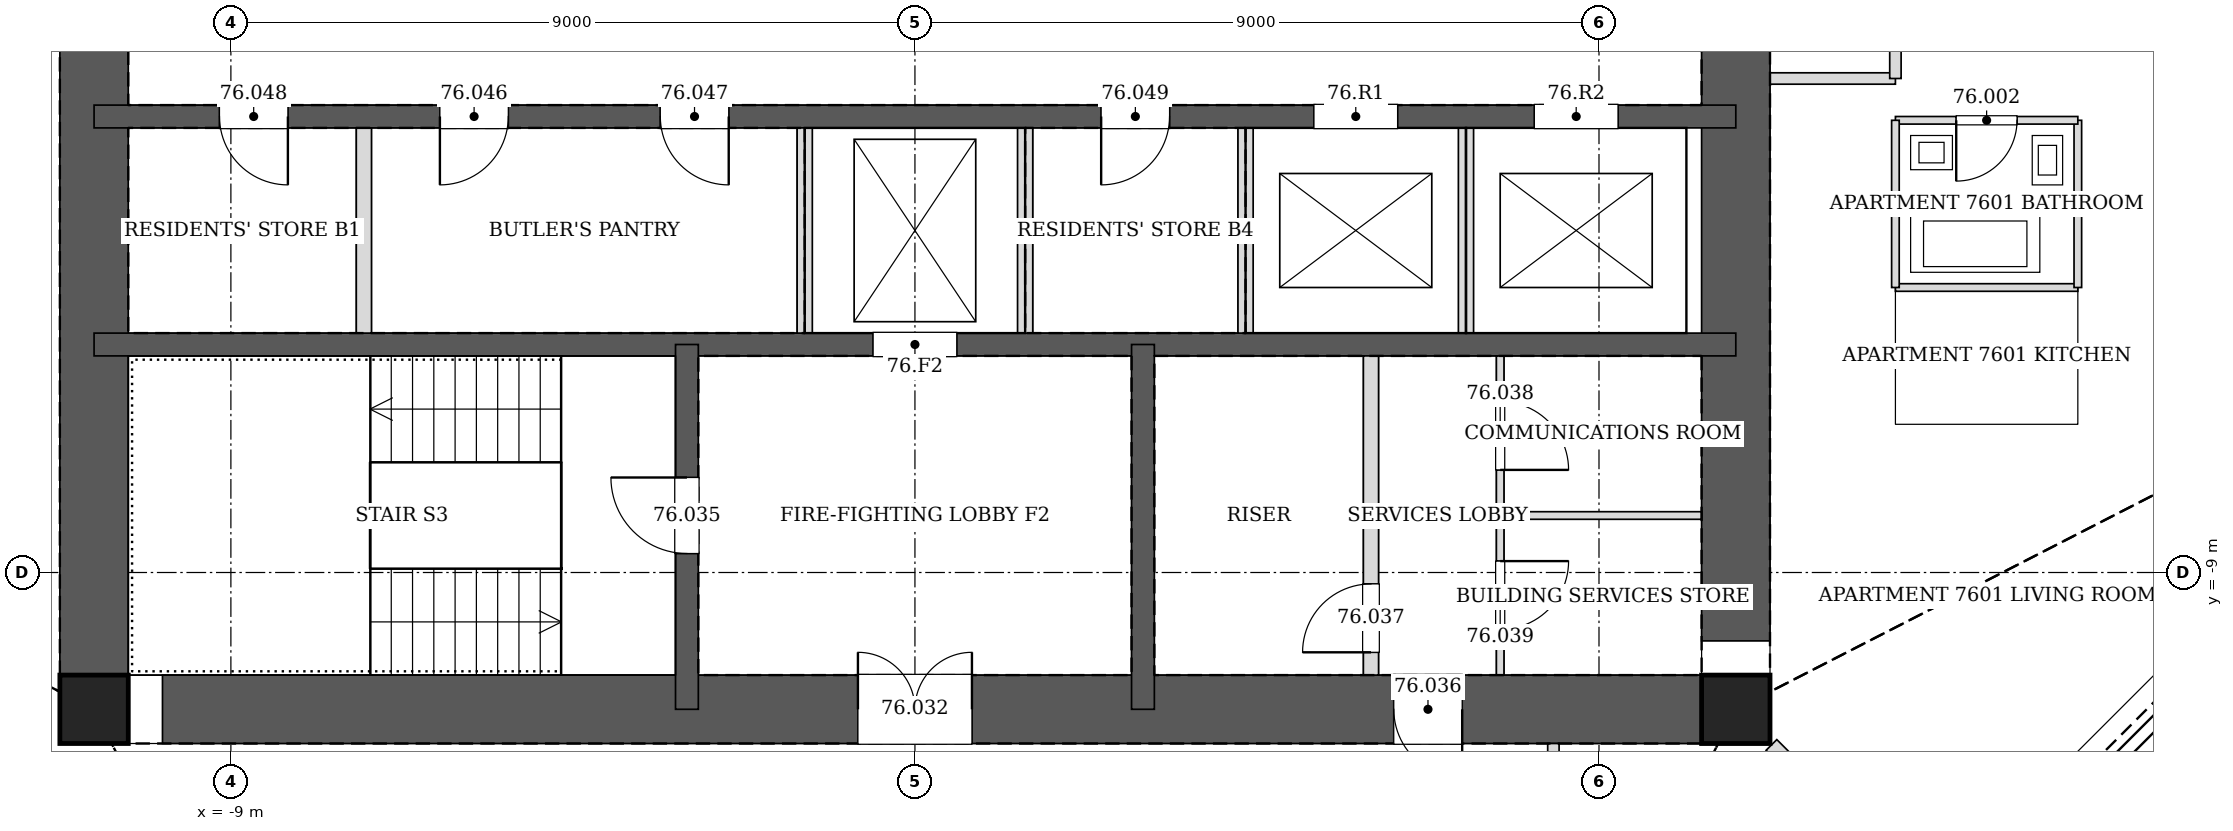
"""IFC4 building model, lengths in metres.
Left out: names, types, materials, properties, quantities, classifications, styles, units other than length and angle.
Written with IfcOpenShell. Run it as: python <this file> out.ifc"""

import sys

from ifc_helpers import new_model, si_unit, direction, frame, frame_2d, origin, origin_2d, place, context, subcontext, project, spatial, rectangle, hollow_rectangle, extrude, element, fill, save


model = new_model("IFC4")
c1 = context("Model", 3, precision=1e-05, world=origin(), true_north=direction((0.0, 1.0)))
c2 = subcontext(c1, "Body", "Model", "MODEL_VIEW")
j1 = project(units=[si_unit("LENGTHUNIT", "METRE"), si_unit("PLANEANGLEUNIT", "RADIAN")], contexts=[c1])
p1 = place(None, origin())
s1 = spatial("IfcSite", under=j1, at=p1, CompositionType="ELEMENT")
p2 = place(p1, origin())
s2 = spatial("IfcBuilding", under=s1, at=p2, CompositionType="ELEMENT")
p3 = place(p2, frame((0.0, 0.0, 308.2)))
s3 = spatial("IfcBuildingStorey", under=s2, at=p3, CompositionType="ELEMENT", Elevation=308.2)
for number, where, z_axis, x_axis in (
    (1, (-10.8, -10.8, 0.0), (0.0, 0.0, 1.0), (1.0, 0.0, 0.0)),
    (2, (10.8, -10.8, 0.0), (0.0, 0.0, 1.0), (1.0, 0.0, 0.0)),
):
    element("IfcColumn", number, at=place(p3, frame(where, z_axis=z_axis, x_axis=x_axis)), inside=s3, PredefinedType="COLUMN", context=c2, shape_type="SweptSolid", body=[
        extrude(hollow_rectangle(XDim=0.9, YDim=0.9, WallThickness=0.04, at=origin_2d()), origin(), (0.0, 0.0, 1.0), 3.4),
    ])
p4 = place(p3, frame((-10.8, -10.8, 0.0), z_axis=(0.0, 0.0, 1.0), x_axis=(1.0, 0.0, 0.0)))
e3 = element("IfcWall", 3, at=p4, inside=s3, PredefinedType="SOLIDWALL", context=c2, shape_type="SweptSolid", body=[
    extrude(rectangle(XDim=21.6, YDim=0.9, at=frame_2d((10.8, 0.0))), origin(), (0.0, 0.0, 1.0), 3.4),
])
p5 = place(p4, frame((10.05, 0.0, 0.0)))
e4 = element("IfcOpeningElement", 4, at=p5, cuts=e3, PredefinedType="OPENING", context=c2, shape_type="SweptSolid", body=[
    extrude(rectangle(XDim=1.5, YDim=2.1, at=frame_2d((0.75, 1.05))), frame((0.0, 0.46, 0.0), z_axis=(0.0, -1.0, 0.0), x_axis=(1.0, 0.0, 0.0)), (0.0, 0.0, 1.0), 0.92),
])
p6 = place(p4, frame((17.1, 0.0, 0.0)))
e5 = element("IfcOpeningElement", 5, at=p6, cuts=e3, PredefinedType="OPENING", context=c2, shape_type="SweptSolid", body=[
    extrude(rectangle(XDim=0.9, YDim=2.1, at=frame_2d((0.45, 1.05))), frame((0.0, 0.46, 0.0), z_axis=(0.0, -1.0, 0.0), x_axis=(1.0, 0.0, 0.0)), (0.0, 0.0, 1.0), 0.92),
])
p7 = place(p3, frame((10.8, -10.8, 0.0), z_axis=(0.0, 0.0, 1.0), x_axis=(0.0, 1.0, 0.0)))
e6 = element("IfcWall", 6, at=p7, inside=s3, PredefinedType="SOLIDWALL", context=c2, shape_type="SweptSolid", body=[
    extrude(rectangle(XDim=21.6, YDim=0.9, at=frame_2d((10.8, 0.0))), origin(), (0.0, 0.0, 1.0), 3.4),
])
p8 = place(p7, frame((11.7, 0.0, 0.0)))
e7 = element("IfcOpeningElement", 7, at=p8, cuts=e6, PredefinedType="OPENING", context=c2, shape_type="SweptSolid", body=[
    extrude(rectangle(XDim=1.2, YDim=2.1, at=frame_2d((0.6, 1.05))), frame((0.0, 0.46, 0.0), z_axis=(0.0, -1.0, 0.0), x_axis=(1.0, 0.0, 0.0)), (0.0, 0.0, 1.0), 0.92),
])
p9 = place(p7, frame((8.7, 0.0, 0.0)))
e8 = element("IfcOpeningElement", 8, at=p9, cuts=e6, PredefinedType="OPENING", context=c2, shape_type="SweptSolid", body=[
    extrude(rectangle(XDim=1.2, YDim=2.1, at=frame_2d((0.6, 1.05))), frame((0.0, 0.46, 0.0), z_axis=(0.0, -1.0, 0.0), x_axis=(1.0, 0.0, 0.0)), (0.0, 0.0, 1.0), 0.92),
])
p10 = place(p3, frame((-10.8, 10.8, 0.0), z_axis=(0.0, 0.0, 1.0), x_axis=(0.0, -1.0, 0.0)))
e9 = element("IfcWall", 9, at=p10, inside=s3, PredefinedType="SOLIDWALL", context=c2, shape_type="SweptSolid", body=[
    extrude(rectangle(XDim=21.6, YDim=0.9, at=frame_2d((10.8, 0.0))), origin(), (0.0, 0.0, 1.0), 3.4),
])
p11 = place(p10, frame((8.7, 0.0, 0.0)))
e10 = element("IfcOpeningElement", 10, at=p11, cuts=e9, PredefinedType="OPENING", context=c2, shape_type="SweptSolid", body=[
    extrude(rectangle(XDim=1.2, YDim=2.1, at=frame_2d((0.6, 1.05))), frame((0.0, 0.46, 0.0), z_axis=(0.0, -1.0, 0.0), x_axis=(1.0, 0.0, 0.0)), (0.0, 0.0, 1.0), 0.92),
])
p12 = place(p10, frame((11.7, 0.0, 0.0)))
e11 = element("IfcOpeningElement", 11, at=p12, cuts=e9, PredefinedType="OPENING", context=c2, shape_type="SweptSolid", body=[
    extrude(rectangle(XDim=1.2, YDim=2.1, at=frame_2d((0.6, 1.05))), frame((0.0, 0.46, 0.0), z_axis=(0.0, -1.0, 0.0), x_axis=(1.0, 0.0, 0.0)), (0.0, 0.0, 1.0), 0.92),
])
p13 = place(p3, frame((-10.8, -3.0, 0.0), z_axis=(0.0, 0.0, 1.0), x_axis=(1.0, 0.0, 0.0)))
e12 = element("IfcWall", 12, at=p13, inside=s3, PredefinedType="SOLIDWALL", context=c2, shape_type="SweptSolid", body=[
    extrude(rectangle(XDim=21.6, YDim=0.3, at=frame_2d((10.8, 0.0))), origin(), (0.0, 0.0, 1.0), 3.4),
])
p14 = place(p13, frame((4.55, 0.0, 0.0)))
e13 = element("IfcOpeningElement", 13, at=p14, cuts=e12, PredefinedType="OPENING", context=c2, shape_type="SweptSolid", body=[
    extrude(rectangle(XDim=0.9, YDim=2.1, at=frame_2d((0.45, 1.05))), frame((0.0, 0.16, 0.0), z_axis=(0.0, -1.0, 0.0), x_axis=(1.0, 0.0, 0.0)), (0.0, 0.0, 1.0), 0.32),
])
p15 = place(p13, frame((7.45, 0.0, 0.0)))
e14 = element("IfcOpeningElement", 14, at=p15, cuts=e12, PredefinedType="OPENING", context=c2, shape_type="SweptSolid", body=[
    extrude(rectangle(XDim=0.9, YDim=2.1, at=frame_2d((0.45, 1.05))), frame((0.0, 0.16, 0.0), z_axis=(0.0, -1.0, 0.0), x_axis=(1.0, 0.0, 0.0)), (0.0, 0.0, 1.0), 0.32),
])
p16 = place(p13, frame((1.65, 0.0, 0.0)))
e15 = element("IfcOpeningElement", 15, at=p16, cuts=e12, PredefinedType="OPENING", context=c2, shape_type="SweptSolid", body=[
    extrude(rectangle(XDim=0.9, YDim=2.1, at=frame_2d((0.45, 1.05))), frame((0.0, 0.16, 0.0), z_axis=(0.0, -1.0, 0.0), x_axis=(1.0, 0.0, 0.0)), (0.0, 0.0, 1.0), 0.32),
])
p17 = place(p13, frame((13.25, 0.0, 0.0)))
e16 = element("IfcOpeningElement", 16, at=p17, cuts=e12, PredefinedType="OPENING", context=c2, shape_type="SweptSolid", body=[
    extrude(rectangle(XDim=0.9, YDim=2.1, at=frame_2d((0.45, 1.05))), frame((0.0, 0.16, 0.0), z_axis=(0.0, -1.0, 0.0), x_axis=(1.0, 0.0, 0.0)), (0.0, 0.0, 1.0), 0.32),
])
p18 = place(p13, frame((16.05, 0.0, 0.0)))
e17 = element("IfcOpeningElement", 17, at=p18, cuts=e12, PredefinedType="OPENING", context=c2, shape_type="SweptSolid", body=[
    extrude(rectangle(XDim=1.1, YDim=2.1, at=frame_2d((0.55, 1.05))), frame((0.0, 0.16, 0.0), z_axis=(0.0, -1.0, 0.0), x_axis=(1.0, 0.0, 0.0)), (0.0, 0.0, 1.0), 0.32),
])
p19 = place(p13, frame((18.95, 0.0, 0.0)))
e18 = element("IfcOpeningElement", 18, at=p19, cuts=e12, PredefinedType="OPENING", context=c2, shape_type="SweptSolid", body=[
    extrude(rectangle(XDim=1.1, YDim=2.1, at=frame_2d((0.55, 1.05))), frame((0.0, 0.16, 0.0), z_axis=(0.0, -1.0, 0.0), x_axis=(1.0, 0.0, 0.0)), (0.0, 0.0, 1.0), 0.32),
])
p20 = place(p3, frame((-10.8, -6.0, 0.0), z_axis=(0.0, 0.0, 1.0), x_axis=(1.0, 0.0, 0.0)))
e19 = element("IfcWall", 19, at=p20, inside=s3, PredefinedType="SOLIDWALL", context=c2, shape_type="SweptSolid", body=[
    extrude(rectangle(XDim=21.6, YDim=0.3, at=frame_2d((10.8, 0.0))), origin(), (0.0, 0.0, 1.0), 3.4),
])
p21 = place(p20, frame((10.25, 0.0, 0.0)))
e20 = element("IfcOpeningElement", 20, at=p21, cuts=e19, PredefinedType="OPENING", context=c2, shape_type="SweptSolid", body=[
    extrude(rectangle(XDim=1.1, YDim=2.1, at=frame_2d((0.55, 1.05))), frame((0.0, 0.16, 0.0), z_axis=(0.0, -1.0, 0.0), x_axis=(1.0, 0.0, 0.0)), (0.0, 0.0, 1.0), 0.32),
])
p22 = place(p3, frame((-3.0, -6.0, 0.0), z_axis=(0.0, 0.0, 1.0), x_axis=(0.0, -1.0, 0.0)))
e21 = element("IfcWall", 21, at=p22, inside=s3, PredefinedType="SOLIDWALL", context=c2, shape_type="SweptSolid", body=[
    extrude(rectangle(XDim=4.8, YDim=0.3, at=frame_2d((2.4, 0.0))), origin(), (0.0, 0.0, 1.0), 3.4),
])
p23 = place(p22, frame((1.75, 0.0, 0.0)))
e22 = element("IfcOpeningElement", 22, at=p23, cuts=e21, PredefinedType="OPENING", context=c2, shape_type="SweptSolid", body=[
    extrude(rectangle(XDim=1.0, YDim=2.1, at=frame_2d((0.5, 1.05))), frame((0.0, 0.16, 0.0), z_axis=(0.0, -1.0, 0.0), x_axis=(1.0, 0.0, 0.0)), (0.0, 0.0, 1.0), 0.32),
])
p24 = place(p3, frame((3.0, -6.0, 0.0), z_axis=(0.0, 0.0, 1.0), x_axis=(0.0, -1.0, 0.0)))
e23 = element("IfcWall", 23, at=p24, inside=s3, PredefinedType="SOLIDWALL", context=c2, shape_type="SweptSolid", body=[
    extrude(rectangle(XDim=4.8, YDim=0.3, at=frame_2d((2.4, 0.0))), origin(), (0.0, 0.0, 1.0), 3.4),
])
p25 = place(p3, frame((11.25, -2.5, 0.0), z_axis=(0.0, 0.0, 1.0), x_axis=(1.0, 0.0, 0.0)))
e24 = element("IfcWall", 24, at=p25, inside=s3, PredefinedType="PARTITIONING", context=c2, shape_type="SweptSolid", body=[
    extrude(rectangle(XDim=1.65, YDim=0.15, at=frame_2d((0.825, 0.0))), origin(), (0.0, 0.0, 1.0), 3.2),
])
p26 = place(p3, frame((12.9, -2.5, 0.0), z_axis=(0.0, 0.0, 1.0), x_axis=(0.0, 1.0, 0.0)))
e25 = element("IfcWall", 25, at=p26, inside=s3, PredefinedType="PARTITIONING", context=c2, shape_type="SweptSolid", body=[
    extrude(rectangle(XDim=2.318, YDim=0.15, at=frame_2d((1.159, 0.0))), origin(), (0.0, 0.0, 1.0), 3.2),
])
p27 = place(p3, frame((8.4, -12.9, 0.0), z_axis=(0.0, 0.0, 1.0), x_axis=(0.0, 1.0, 0.0)))
e26 = element("IfcWall", 26, at=p27, inside=s3, PredefinedType="PARTITIONING", context=c2, shape_type="SweptSolid", body=[
    extrude(rectangle(XDim=1.65, YDim=0.15, at=frame_2d((0.825, 0.0))), origin(), (0.0, 0.0, 1.0), 3.2),
])
p28 = place(p3, frame((15.3, -5.25, 0.0), z_axis=(0.0, 0.0, 1.0), x_axis=(-1.0, 0.0, 0.0)))
e27 = element("IfcWall", 27, at=p28, inside=s3, PredefinedType="PARTITIONING", context=c2, shape_type="SweptSolid", body=[
    extrude(rectangle(XDim=2.4, YDim=0.1, at=frame_2d((1.2, 0.0))), origin(), (0.0, 0.0, 1.0), 2.588),
])
p29 = place(p3, frame((15.3, -5.25, 0.0), z_axis=(0.0, 0.0, 1.0), x_axis=(0.0, 1.0, 0.0)))
e28 = element("IfcWall", 28, at=p29, inside=s3, PredefinedType="PARTITIONING", context=c2, shape_type="SweptSolid", body=[
    extrude(rectangle(XDim=2.2, YDim=0.1, at=frame_2d((1.1, 0.0))), origin(), (0.0, 0.0, 1.0), 3.2),
])
p30 = place(p3, frame((15.3, -3.05, 0.0), z_axis=(0.0, 0.0, 1.0), x_axis=(-1.0, 0.0, 0.0)))
e29 = element("IfcWall", 29, at=p30, inside=s3, PredefinedType="PARTITIONING", context=c2, shape_type="SweptSolid", body=[
    extrude(rectangle(XDim=2.4, YDim=0.1, at=frame_2d((1.2, 0.0))), origin(), (0.0, 0.0, 1.0), 2.588),
])
p31 = place(p30, frame((0.8, 0.0, 0.0)))
e30 = element("IfcOpeningElement", 30, at=p31, cuts=e29, PredefinedType="OPENING", context=c2, shape_type="SweptSolid", body=[
    extrude(rectangle(XDim=0.8, YDim=2.1, at=frame_2d((0.4, 1.05))), frame((0.0, 0.06, 0.0), z_axis=(0.0, -1.0, 0.0), x_axis=(1.0, 0.0, 0.0)), (0.0, 0.0, 1.0), 0.12),
])
p32 = place(p3, frame((12.9, -3.05, 0.0), z_axis=(0.0, 0.0, 1.0), x_axis=(0.0, -1.0, 0.0)))
e31 = element("IfcWall", 31, at=p32, inside=s3, PredefinedType="PARTITIONING", context=c2, shape_type="SweptSolid", body=[
    extrude(rectangle(XDim=2.2, YDim=0.1, at=frame_2d((1.1, 0.0))), origin(), (0.0, 0.0, 1.0), 3.2),
])
p33 = place(p3, frame((11.269, -11.269, 0.0), z_axis=(0.0, 0.0, 1.0), x_axis=(0.707106781187, -0.707106781187, 0.0)))
e32 = element("IfcWall", 32, at=p33, inside=s3, PredefinedType="PARTITIONING", context=c2, shape_type="SweptSolid", body=[
    extrude(rectangle(XDim=2.219, YDim=0.2, at=frame_2d((1.109, 0.0))), origin(), (0.0, 0.0, 1.0), 2.591),
])
for number, where, z_axis, x_axis in (
    (33, (-7.25, -5.85, 0.0), (0.0, 0.0, 1.0), (0.0, 1.0, 0.0)),
    (34, (-1.45, -5.85, 0.0), (0.0, 0.0, 1.0), (0.0, 1.0, 0.0)),
    (35, (1.45, -5.85, 0.0), (0.0, 0.0, 1.0), (0.0, 1.0, 0.0)),
    (36, (4.35, -5.85, 0.0), (0.0, 0.0, 1.0), (0.0, 1.0, 0.0)),
):
    element("IfcWall", number, at=place(p3, frame(where, z_axis=z_axis, x_axis=x_axis)), inside=s3, PredefinedType="PARTITIONING", context=c2, shape_type="SweptSolid", body=[
        extrude(rectangle(XDim=2.7, YDim=0.2, at=frame_2d((1.35, 0.0))), origin(), (0.0, 0.0, 1.0), 3.2),
    ])
p34 = place(p3, frame((7.25, -5.85, 0.0), z_axis=(0.0, 0.0, 1.0), x_axis=(0.0, 1.0, 0.0)))
e37 = element("IfcWall", 37, at=p34, inside=s3, PredefinedType="PARTITIONING", context=c2, shape_type="SweptSolid", body=[
    extrude(rectangle(XDim=2.7, YDim=0.2, at=frame_2d((1.35, 0.0))), origin(), (0.0, 0.0, 1.0), 3.4),
])
p35 = place(p3, frame((6.0, -10.35, 0.0), z_axis=(0.0, 0.0, 1.0), x_axis=(0.0, 1.0, 0.0)))
e38 = element("IfcWall", 38, at=p35, inside=s3, PredefinedType="PARTITIONING", context=c2, shape_type="SweptSolid", body=[
    extrude(rectangle(XDim=4.2, YDim=0.2, at=frame_2d((2.1, 0.0))), origin(), (0.0, 0.0, 1.0), 3.2),
])
p36 = place(p35, frame((0.3, 0.0, 0.0)))
e39 = element("IfcOpeningElement", 39, at=p36, cuts=e38, PredefinedType="OPENING", context=c2, shape_type="SweptSolid", body=[
    extrude(rectangle(XDim=0.9, YDim=2.1, at=frame_2d((0.45, 1.05))), frame((0.0, 0.11, 0.0), z_axis=(0.0, -1.0, 0.0), x_axis=(1.0, 0.0, 0.0)), (0.0, 0.0, 1.0), 0.22),
])
p37 = place(p3, frame((7.7, -10.35, 0.0), z_axis=(0.0, 0.0, 1.0), x_axis=(0.0, 1.0, 0.0)))
e40 = element("IfcWall", 40, at=p37, inside=s3, PredefinedType="PARTITIONING", context=c2, shape_type="SweptSolid", body=[
    extrude(rectangle(XDim=4.2, YDim=0.1, at=frame_2d((2.1, 0.0))), origin(), (0.0, 0.0, 1.0), 3.2),
])
p38 = place(p37, frame((2.7, 0.0, 0.0)))
e41 = element("IfcOpeningElement", 41, at=p38, cuts=e40, PredefinedType="OPENING", context=c2, shape_type="SweptSolid", body=[
    extrude(rectangle(XDim=0.9, YDim=2.1, at=frame_2d((0.45, 1.05))), frame((0.0, 0.06, 0.0), z_axis=(0.0, -1.0, 0.0), x_axis=(1.0, 0.0, 0.0)), (0.0, 0.0, 1.0), 0.12),
])
p39 = place(p37, frame((0.6, 0.0, 0.0)))
e42 = element("IfcOpeningElement", 42, at=p39, cuts=e40, PredefinedType="OPENING", context=c2, shape_type="SweptSolid", body=[
    extrude(rectangle(XDim=0.9, YDim=2.1, at=frame_2d((0.45, 1.05))), frame((0.0, 0.06, 0.0), z_axis=(0.0, -1.0, 0.0), x_axis=(1.0, 0.0, 0.0)), (0.0, 0.0, 1.0), 0.12),
])
p40 = place(p3, frame((7.7, -8.25, 0.0), z_axis=(0.0, 0.0, 1.0), x_axis=(1.0, 0.0, 0.0)))
e43 = element("IfcWall", 43, at=p40, inside=s3, PredefinedType="PARTITIONING", context=c2, shape_type="SweptSolid", body=[
    extrude(rectangle(XDim=2.65, YDim=0.1, at=frame_2d((1.325, 0.0))), origin(), (0.0, 0.0, 1.0), 3.2),
])
p41 = place(p31, origin())
e44 = element("IfcDoor", 44, at=p41, inside=s3, OperationType="SINGLE_SWING_RIGHT", PredefinedType="DOOR", context=c2, shape_type="SweptSolid", body=[
    extrude(rectangle(XDim=0.8, YDim=2.1, at=frame_2d((0.4, 1.05))), frame((0.0, 0.025, 0.0), z_axis=(0.0, -1.0, 0.0), x_axis=(1.0, 0.0, 0.0)), (0.0, 0.0, 1.0), 0.05),
])
fill(e30, e44)
p42 = place(p5, origin())
e45 = element("IfcDoor", 45, at=p42, inside=s3, OperationType="DOUBLE_DOOR_SINGLE_SWING", PredefinedType="DOOR", context=c2, shape_type="SweptSolid", body=[
    extrude(rectangle(XDim=1.5, YDim=2.1, at=frame_2d((0.75, 1.05))), frame((0.0, 0.025, 0.0), z_axis=(0.0, -1.0, 0.0), x_axis=(1.0, 0.0, 0.0)), (0.0, 0.0, 1.0), 0.05),
])
fill(e4, e45)
p43 = place(p23, frame((1.0, 0.0, 0.0), z_axis=(0.0, 0.0, 1.0), x_axis=(-1.0, 0.0, 0.0)))
e46 = element("IfcDoor", 46, at=p43, inside=s3, OperationType="SINGLE_SWING_RIGHT", PredefinedType="DOOR", context=c2, shape_type="SweptSolid", body=[
    extrude(rectangle(XDim=1.0, YDim=2.1, at=frame_2d((0.5, 1.05))), frame((0.0, 0.025, 0.0), z_axis=(0.0, -1.0, 0.0), x_axis=(1.0, 0.0, 0.0)), (0.0, 0.0, 1.0), 0.05),
])
fill(e22, e46)
p44 = place(p6, frame((0.9, 0.0, 0.0), z_axis=(0.0, 0.0, 1.0), x_axis=(-1.0, 0.0, 0.0)))
e47 = element("IfcDoor", 47, at=p44, inside=s3, OperationType="SINGLE_SWING_LEFT", PredefinedType="DOOR", context=c2, shape_type="SweptSolid", body=[
    extrude(rectangle(XDim=0.9, YDim=2.1, at=frame_2d((0.45, 1.05))), frame((0.0, 0.025, 0.0), z_axis=(0.0, -1.0, 0.0), x_axis=(1.0, 0.0, 0.0)), (0.0, 0.0, 1.0), 0.05),
])
fill(e5, e47)
p45 = place(p36, origin())
e48 = element("IfcDoor", 48, at=p45, inside=s3, OperationType="SINGLE_SWING_LEFT", PredefinedType="DOOR", context=c2, shape_type="SweptSolid", body=[
    extrude(rectangle(XDim=0.9, YDim=2.1, at=frame_2d((0.45, 1.05))), frame((0.0, 0.025, 0.0), z_axis=(0.0, -1.0, 0.0), x_axis=(1.0, 0.0, 0.0)), (0.0, 0.0, 1.0), 0.05),
])
fill(e39, e48)
p46 = place(p38, frame((0.9, 0.0, 0.0), z_axis=(0.0, 0.0, 1.0), x_axis=(-1.0, 0.0, 0.0)))
e49 = element("IfcDoor", 49, at=p46, inside=s3, OperationType="SINGLE_SWING_RIGHT", PredefinedType="DOOR", context=c2, shape_type="SweptSolid", body=[
    extrude(rectangle(XDim=0.9, YDim=2.1, at=frame_2d((0.45, 1.05))), frame((0.0, 0.025, 0.0), z_axis=(0.0, -1.0, 0.0), x_axis=(1.0, 0.0, 0.0)), (0.0, 0.0, 1.0), 0.05),
])
fill(e41, e49)
p47 = place(p39, frame((0.9, 0.0, 0.0), z_axis=(0.0, 0.0, 1.0), x_axis=(-1.0, 0.0, 0.0)))
e50 = element("IfcDoor", 50, at=p47, inside=s3, OperationType="SINGLE_SWING_LEFT", PredefinedType="DOOR", context=c2, shape_type="SweptSolid", body=[
    extrude(rectangle(XDim=0.9, YDim=2.1, at=frame_2d((0.45, 1.05))), frame((0.0, 0.025, 0.0), z_axis=(0.0, -1.0, 0.0), x_axis=(1.0, 0.0, 0.0)), (0.0, 0.0, 1.0), 0.05),
])
fill(e42, e50)
p48 = place(p14, frame((0.9, 0.0, 0.0), z_axis=(0.0, 0.0, 1.0), x_axis=(-1.0, 0.0, 0.0)))
e51 = element("IfcDoor", 51, at=p48, inside=s3, OperationType="SINGLE_SWING_RIGHT", PredefinedType="DOOR", context=c2, shape_type="SweptSolid", body=[
    extrude(rectangle(XDim=0.9, YDim=2.1, at=frame_2d((0.45, 1.05))), frame((0.0, 0.025, 0.0), z_axis=(0.0, -1.0, 0.0), x_axis=(1.0, 0.0, 0.0)), (0.0, 0.0, 1.0), 0.05),
])
fill(e13, e51)
p49 = place(p15, frame((0.9, 0.0, 0.0), z_axis=(0.0, 0.0, 1.0), x_axis=(-1.0, 0.0, 0.0)))
e52 = element("IfcDoor", 52, at=p49, inside=s3, OperationType="SINGLE_SWING_LEFT", PredefinedType="DOOR", context=c2, shape_type="SweptSolid", body=[
    extrude(rectangle(XDim=0.9, YDim=2.1, at=frame_2d((0.45, 1.05))), frame((0.0, 0.025, 0.0), z_axis=(0.0, -1.0, 0.0), x_axis=(1.0, 0.0, 0.0)), (0.0, 0.0, 1.0), 0.05),
])
fill(e14, e52)
p50 = place(p16, frame((0.9, 0.0, 0.0), z_axis=(0.0, 0.0, 1.0), x_axis=(-1.0, 0.0, 0.0)))
e53 = element("IfcDoor", 53, at=p50, inside=s3, OperationType="SINGLE_SWING_LEFT", PredefinedType="DOOR", context=c2, shape_type="SweptSolid", body=[
    extrude(rectangle(XDim=0.9, YDim=2.1, at=frame_2d((0.45, 1.05))), frame((0.0, 0.025, 0.0), z_axis=(0.0, -1.0, 0.0), x_axis=(1.0, 0.0, 0.0)), (0.0, 0.0, 1.0), 0.05),
])
fill(e15, e53)
p51 = place(p17, frame((0.9, 0.0, 0.0), z_axis=(0.0, 0.0, 1.0), x_axis=(-1.0, 0.0, 0.0)))
e54 = element("IfcDoor", 54, at=p51, inside=s3, OperationType="SINGLE_SWING_RIGHT", PredefinedType="DOOR", context=c2, shape_type="SweptSolid", body=[
    extrude(rectangle(XDim=0.9, YDim=2.1, at=frame_2d((0.45, 1.05))), frame((0.0, 0.025, 0.0), z_axis=(0.0, -1.0, 0.0), x_axis=(1.0, 0.0, 0.0)), (0.0, 0.0, 1.0), 0.05),
])
fill(e16, e54)
p52 = place(p21, origin())
e55 = element("IfcDoor", 55, at=p52, inside=s3, OperationType="DOUBLE_DOOR_SLIDING", PredefinedType="DOOR", context=c2, shape_type="SweptSolid", body=[
    extrude(rectangle(XDim=1.1, YDim=2.1, at=frame_2d((0.55, 1.05))), frame((0.0, 0.025, 0.0), z_axis=(0.0, -1.0, 0.0), x_axis=(1.0, 0.0, 0.0)), (0.0, 0.0, 1.0), 0.05),
])
fill(e20, e55)
p53 = place(p18, origin())
e56 = element("IfcDoor", 56, at=p53, inside=s3, OperationType="DOUBLE_DOOR_SLIDING", PredefinedType="DOOR", context=c2, shape_type="SweptSolid", body=[
    extrude(rectangle(XDim=1.1, YDim=2.1, at=frame_2d((0.55, 1.05))), frame((0.0, 0.025, 0.0), z_axis=(0.0, -1.0, 0.0), x_axis=(1.0, 0.0, 0.0)), (0.0, 0.0, 1.0), 0.05),
])
fill(e17, e56)
p54 = place(p19, origin())
e57 = element("IfcDoor", 57, at=p54, inside=s3, OperationType="DOUBLE_DOOR_SLIDING", PredefinedType="DOOR", context=c2, shape_type="SweptSolid", body=[
    extrude(rectangle(XDim=1.1, YDim=2.1, at=frame_2d((0.55, 1.05))), frame((0.0, 0.025, 0.0), z_axis=(0.0, -1.0, 0.0), x_axis=(1.0, 0.0, 0.0)), (0.0, 0.0, 1.0), 0.05),
])
fill(e18, e57)
save(model, sys.argv[1])
